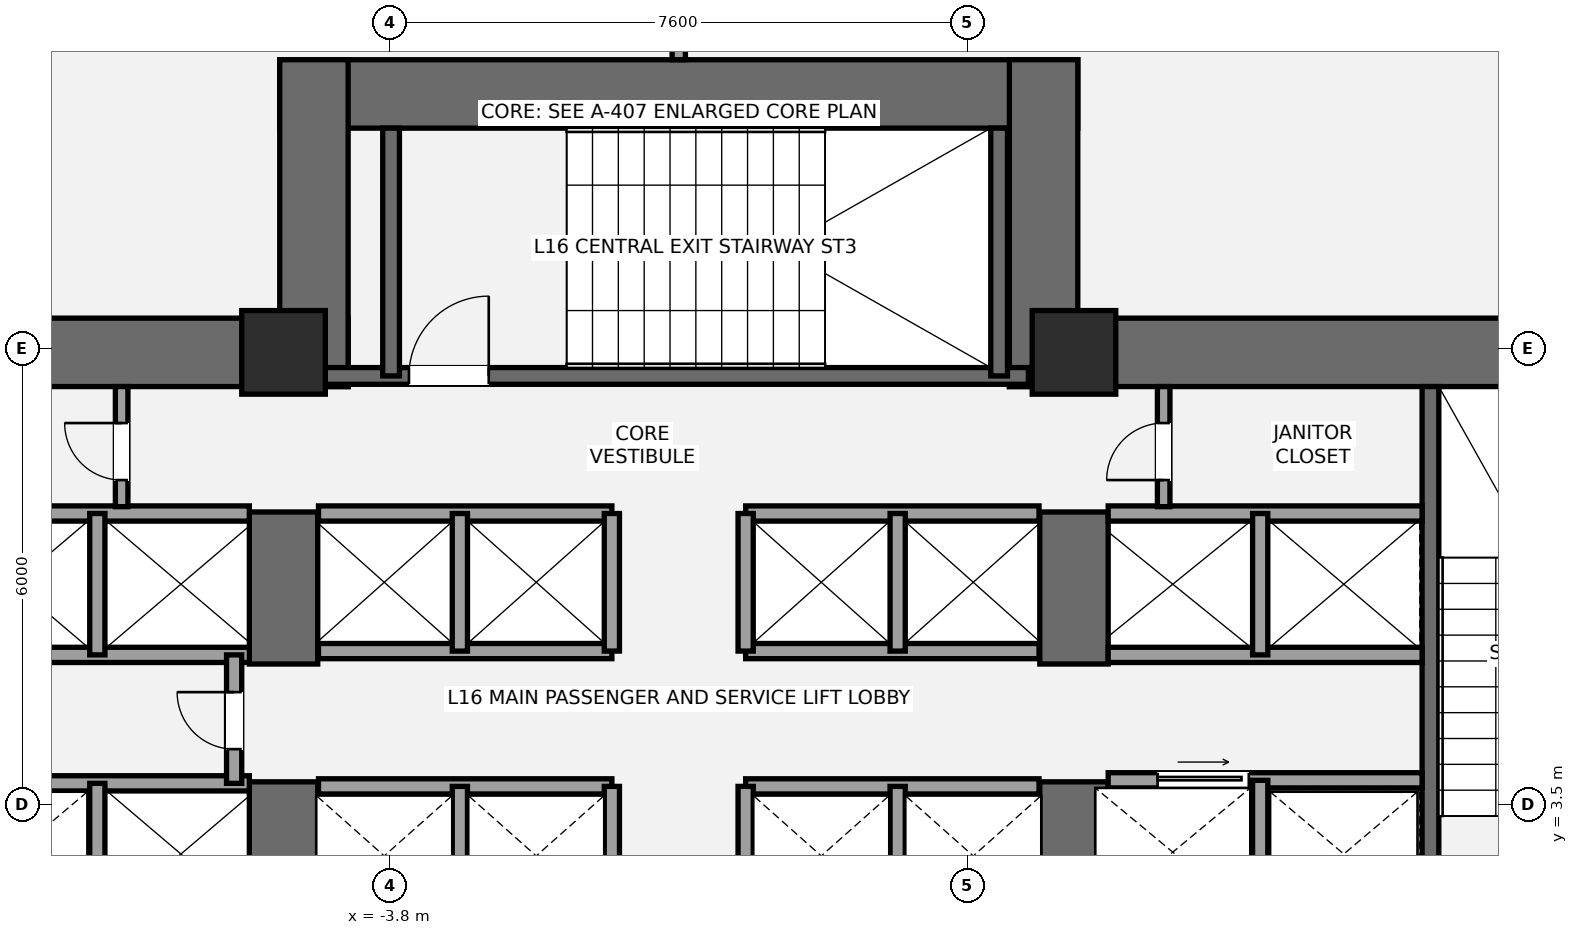
"""IFC4 building model, lengths in metres.
Left out: names, types, materials, properties, quantities, classifications, styles, units other than length and angle.
Written with IfcOpenShell. Run it as: python <this file> out.ifc"""

import sys

from ifc_helpers import new_model, si_unit, direction, frame, frame_2d, origin, origin_2d, place, context, subcontext, project, spatial, rectangle, extrude, element, fill, save


model = new_model("IFC4")
c1 = context("Model", 3, precision=1e-05, world=origin(), true_north=direction((0.0, 1.0)))
c2 = subcontext(c1, "Body", "Model", "MODEL_VIEW")
j1 = project(units=[si_unit("LENGTHUNIT", "METRE"), si_unit("PLANEANGLEUNIT", "RADIAN")], contexts=[c1])
p1 = place(None, origin())
s1 = spatial("IfcSite", under=j1, at=p1, CompositionType="ELEMENT")
p2 = place(p1, origin())
s2 = spatial("IfcBuilding", under=s1, at=p2, CompositionType="ELEMENT")
p3 = place(p2, frame((0.0, 0.0, 63.0)))
s3 = spatial("IfcBuildingStorey", under=s2, at=p3, CompositionType="ELEMENT", Elevation=63.0)
p4 = place(p3, frame((-14.05, 9.45, 0.0), z_axis=(0.0, 0.0, 1.0), x_axis=(1.0, 0.0, 0.0)))
e1 = element("IfcWall", 1, at=p4, inside=s3, PredefinedType="SHEAR", context=c2, shape_type="SweptSolid", body=[
    extrude(rectangle(XDim=9.7, YDim=0.9, at=frame_2d((4.85, 0.0))), origin(), (0.0, 0.0, 1.0), 3.6),
])
p5 = place(p3, frame((-5.2, 0.95, 0.0), z_axis=(0.0, 0.0, 1.0), x_axis=(0.0, 1.0, 0.0)))
e2 = element("IfcWall", 2, at=p5, inside=s3, PredefinedType="SHEAR", context=c2, shape_type="SweptSolid", body=[
    extrude(rectangle(XDim=2.85, YDim=0.9, at=frame_2d((1.425, 0.0))), origin(), (0.0, 0.0, 1.0), 3.6),
])
p6 = place(p3, frame((-5.2, 5.35, 0.0), z_axis=(0.0, 0.0, 1.0), x_axis=(0.0, 1.0, 0.0)))
e3 = element("IfcWall", 3, at=p6, inside=s3, PredefinedType="SHEAR", context=c2, shape_type="SweptSolid", body=[
    extrude(rectangle(XDim=2.0, YDim=0.9, at=frame_2d((1.0, 0.0))), origin(), (0.0, 0.0, 1.0), 3.6),
])
p7 = place(p3, frame((4.35, 9.45, 0.0), z_axis=(0.0, 0.0, 1.0), x_axis=(1.0, 0.0, 0.0)))
e4 = element("IfcWall", 4, at=p7, inside=s3, PredefinedType="SHEAR", context=c2, shape_type="SweptSolid", body=[
    extrude(rectangle(XDim=9.7, YDim=0.9, at=frame_2d((4.85, 0.0))), origin(), (0.0, 0.0, 1.0), 3.6),
])
p8 = place(p3, frame((5.2, 0.95, 0.0), z_axis=(0.0, 0.0, 1.0), x_axis=(0.0, 1.0, 0.0)))
e5 = element("IfcWall", 5, at=p8, inside=s3, PredefinedType="SHEAR", context=c2, shape_type="SweptSolid", body=[
    extrude(rectangle(XDim=2.85, YDim=0.9, at=frame_2d((1.425, 0.0))), origin(), (0.0, 0.0, 1.0), 3.6),
])
p9 = place(p3, frame((5.2, 5.35, 0.0), z_axis=(0.0, 0.0, 1.0), x_axis=(0.0, 1.0, 0.0)))
e6 = element("IfcWall", 6, at=p9, inside=s3, PredefinedType="SHEAR", context=c2, shape_type="SweptSolid", body=[
    extrude(rectangle(XDim=2.0, YDim=0.9, at=frame_2d((1.0, 0.0))), origin(), (0.0, 0.0, 1.0), 3.6),
])
p10 = place(p3, frame((9.89, 1.85, 0.0), z_axis=(0.0, 0.0, 1.0), x_axis=(0.0, 1.0, 0.0)))
e7 = element("IfcWall", 7, at=p10, inside=s3, PredefinedType="SHEAR", context=c2, shape_type="SweptSolid", body=[
    extrude(rectangle(XDim=7.15, YDim=0.22, at=frame_2d((3.575, 0.0))), origin(), (0.0, 0.0, 1.0), 3.6),
])
p11 = place(p3, frame((-5.25, 12.85, 0.0), z_axis=(0.0, 0.0, 1.0), x_axis=(1.0, 0.0, 0.0)))
e8 = element("IfcWall", 8, at=p11, inside=s3, PredefinedType="SHEAR", context=c2, shape_type="SweptSolid", body=[
    extrude(rectangle(XDim=10.5, YDim=0.9, at=frame_2d((5.25, 0.0))), origin(), (0.0, 0.0, 1.0), 3.6),
])
for number, where, z_axis, x_axis in (
    (9, (-4.8, 9.0, 0.0), (0.0, 0.0, 1.0), (0.0, 1.0, 0.0)),
    (10, (4.8, 9.0, 0.0), (0.0, 0.0, 1.0), (0.0, 1.0, 0.0)),
):
    element("IfcWall", number, at=place(p3, frame(where, z_axis=z_axis, x_axis=x_axis)), inside=s3, PredefinedType="SHEAR", context=c2, shape_type="SweptSolid", body=[
        extrude(rectangle(XDim=4.3, YDim=0.9, at=frame_2d((2.15, 0.0))), origin(), (0.0, 0.0, 1.0), 3.6),
    ])
p12 = place(p3, frame((-4.7, 9.14, 0.0), z_axis=(0.0, 0.0, 1.0), x_axis=(1.0, 0.0, 0.0)))
e11 = element("IfcWall", 11, at=p12, inside=s3, PredefinedType="SHEAR", context=c2, shape_type="SweptSolid", body=[
    extrude(rectangle(XDim=9.3, YDim=0.22, at=frame_2d((4.65, 0.0))), origin(), (0.0, 0.0, 1.0), 3.6),
])
p13 = place(p12, frame((1.15, 0.0, 0.0)))
e12 = element("IfcOpeningElement", 12, at=p13, cuts=e11, PredefinedType="OPENING", context=c2, shape_type="SweptSolid", body=[
    extrude(rectangle(XDim=1.05, YDim=2.15, at=frame_2d((0.525, 1.075))), frame((0.0, 0.12, 0.0), z_axis=(0.0, -1.0, 0.0), x_axis=(1.0, 0.0, 0.0)), (0.0, 0.0, 1.0), 0.24),
])
for number, where, z_axis, x_axis in (
    (13, (-3.785, 9.14, 0.0), (0.0, 0.0, 1.0), (0.0, 1.0, 0.0)),
    (14, (4.215, 9.14, 0.0), (0.0, 0.0, 1.0), (0.0, 1.0, 0.0)),
):
    element("IfcWall", number, at=place(p3, frame(where, z_axis=z_axis, x_axis=x_axis)), inside=s3, PredefinedType="SHEAR", context=c2, shape_type="SweptSolid", body=[
        extrude(rectangle(XDim=3.26, YDim=0.22, at=frame_2d((1.63, 0.0))), origin(), (0.0, 0.0, 1.0), 3.6),
    ])
for number, where, z_axis, x_axis in (
    (15, (-5.2, 9.45, 0.0), (0.0, 0.0, 1.0), (1.0, 0.0, 0.0)),
    (16, (5.2, 9.45, 0.0), (0.0, 0.0, 1.0), (1.0, 0.0, 0.0)),
):
    element("IfcColumn", number, at=place(p3, frame(where, z_axis=z_axis, x_axis=x_axis)), inside=s3, PredefinedType="COLUMN", context=c2, shape_type="SweptSolid", body=[
        extrude(rectangle(XDim=1.1, YDim=1.1, at=origin_2d()), origin(), (0.0, 0.0, 1.0), 3.6),
    ])
p14 = place(p3, frame((-9.78, 3.78, 0.0), z_axis=(0.0, 0.0, 1.0), x_axis=(1.0, 0.0, 0.0)))
e17 = element("IfcWall", 17, at=p14, inside=s3, PredefinedType="SOLIDWALL", context=c2, shape_type="SweptSolid", body=[
    extrude(rectangle(XDim=4.13, YDim=0.2, at=frame_2d((2.065, 0.0))), origin(), (0.0, 0.0, 1.0), 3.4),
])
p15 = place(p3, frame((-7.65, 1.85, 0.0), z_axis=(0.0, 0.0, 1.0), x_axis=(0.0, 1.0, 0.0)))
e18 = element("IfcWall", 18, at=p15, inside=s3, PredefinedType="SOLIDWALL", context=c2, shape_type="SweptSolid", body=[
    extrude(rectangle(XDim=1.93, YDim=0.2, at=frame_2d((0.965, 0.0))), origin(), (0.0, 0.0, 1.0), 3.4),
])
for number, where, z_axis, x_axis in (
    (19, (-9.78, 5.47, 0.0), (0.0, 0.0, 1.0), (1.0, 0.0, 0.0)),
    (20, (-9.78, 7.33, 0.0), (0.0, 0.0, 1.0), (1.0, 0.0, 0.0)),
):
    element("IfcWall", number, at=place(p3, frame(where, z_axis=z_axis, x_axis=x_axis)), inside=s3, PredefinedType="SOLIDWALL", context=c2, shape_type="SweptSolid", body=[
        extrude(rectangle(XDim=4.13, YDim=0.2, at=frame_2d((2.065, 0.0))), origin(), (0.0, 0.0, 1.0), 3.4),
    ])
p16 = place(p3, frame((-7.65, 5.47, 0.0), z_axis=(0.0, 0.0, 1.0), x_axis=(0.0, 1.0, 0.0)))
e21 = element("IfcWall", 21, at=p16, inside=s3, PredefinedType="SOLIDWALL", context=c2, shape_type="SweptSolid", body=[
    extrude(rectangle(XDim=1.86, YDim=0.2, at=frame_2d((0.93, 0.0))), origin(), (0.0, 0.0, 1.0), 3.4),
])
p17 = place(p3, frame((-5.85, 3.78, 0.0), z_axis=(0.0, 0.0, 1.0), x_axis=(0.0, 1.0, 0.0)))
e22 = element("IfcWall", 22, at=p17, inside=s3, PredefinedType="SOLIDWALL", context=c2, shape_type="SweptSolid", body=[
    extrude(rectangle(XDim=1.69, YDim=0.2, at=frame_2d((0.845, 0.0))), origin(), (0.0, 0.0, 1.0), 3.4),
])
p18 = place(p17, frame((0.45, 0.0, 0.0)))
e23 = element("IfcOpeningElement", 23, at=p18, cuts=e22, PredefinedType="OPENING", context=c2, shape_type="SweptSolid", body=[
    extrude(rectangle(XDim=0.75, YDim=2.1, at=frame_2d((0.375, 1.05))), frame((0.0, 0.11, 0.0), z_axis=(0.0, -1.0, 0.0), x_axis=(1.0, 0.0, 0.0)), (0.0, 0.0, 1.0), 0.22),
])
p19 = place(p3, frame((5.65, 3.82, 0.0), z_axis=(0.0, 0.0, 1.0), x_axis=(1.0, 0.0, 0.0)))
e24 = element("IfcWall", 24, at=p19, inside=s3, PredefinedType="SOLIDWALL", context=c2, shape_type="SweptSolid", body=[
    extrude(rectangle(XDim=4.13, YDim=0.2, at=frame_2d((2.065, 0.0))), origin(), (0.0, 0.0, 1.0), 3.4),
])
p20 = place(p19, frame((0.65, 0.0, 0.0)))
e25 = element("IfcOpeningElement", 25, at=p20, cuts=e24, PredefinedType="OPENING", context=c2, shape_type="SweptSolid", body=[
    extrude(rectangle(XDim=1.2, YDim=2.2, at=frame_2d((0.6, 1.1))), frame((0.0, 0.11, 0.0), z_axis=(0.0, -1.0, 0.0), x_axis=(1.0, 0.0, 0.0)), (0.0, 0.0, 1.0), 0.22),
])
p21 = place(p3, frame((7.65, 1.85, 0.0), z_axis=(0.0, 0.0, 1.0), x_axis=(0.0, 1.0, 0.0)))
e26 = element("IfcWall", 26, at=p21, inside=s3, PredefinedType="SOLIDWALL", context=c2, shape_type="SweptSolid", body=[
    extrude(rectangle(XDim=1.97, YDim=0.2, at=frame_2d((0.985, 0.0))), origin(), (0.0, 0.0, 1.0), 3.4),
])
for number, where, z_axis, x_axis in (
    (27, (5.65, 5.47, 0.0), (0.0, 0.0, 1.0), (1.0, 0.0, 0.0)),
    (28, (5.65, 7.33, 0.0), (0.0, 0.0, 1.0), (1.0, 0.0, 0.0)),
):
    element("IfcWall", number, at=place(p3, frame(where, z_axis=z_axis, x_axis=x_axis)), inside=s3, PredefinedType="SOLIDWALL", context=c2, shape_type="SweptSolid", body=[
        extrude(rectangle(XDim=4.13, YDim=0.2, at=frame_2d((2.065, 0.0))), origin(), (0.0, 0.0, 1.0), 3.4),
    ])
p22 = place(p3, frame((7.65, 5.47, 0.0), z_axis=(0.0, 0.0, 1.0), x_axis=(0.0, 1.0, 0.0)))
e29 = element("IfcWall", 29, at=p22, inside=s3, PredefinedType="SOLIDWALL", context=c2, shape_type="SweptSolid", body=[
    extrude(rectangle(XDim=1.86, YDim=0.2, at=frame_2d((0.93, 0.0))), origin(), (0.0, 0.0, 1.0), 3.4),
])
for number, where, z_axis, x_axis in (
    (30, (-4.74, 3.74, 0.0), (0.0, 0.0, 1.0), (1.0, 0.0, 0.0)),
    (31, (0.88, 3.74, 0.0), (0.0, 0.0, 1.0), (1.0, 0.0, 0.0)),
):
    element("IfcWall", number, at=place(p3, frame(where, z_axis=z_axis, x_axis=x_axis)), inside=s3, PredefinedType="SOLIDWALL", context=c2, shape_type="SweptSolid", body=[
        extrude(rectangle(XDim=3.86, YDim=0.2, at=frame_2d((1.93, 0.0))), origin(), (0.0, 0.0, 1.0), 3.4),
    ])
for number, where, z_axis, x_axis in (
    (32, (-2.88, 1.92, 0.0), (0.0, 0.0, 1.0), (0.0, 1.0, 0.0)),
    (33, (2.88, 1.92, 0.0), (0.0, 0.0, 1.0), (0.0, 1.0, 0.0)),
    (34, (-0.88, 1.92, 0.0), (0.0, 0.0, 1.0), (0.0, 1.0, 0.0)),
    (35, (0.88, 1.92, 0.0), (0.0, 0.0, 1.0), (0.0, 1.0, 0.0)),
):
    element("IfcWall", number, at=place(p3, frame(where, z_axis=z_axis, x_axis=x_axis)), inside=s3, PredefinedType="SOLIDWALL", context=c2, shape_type="SweptSolid", body=[
        extrude(rectangle(XDim=1.82, YDim=0.2, at=frame_2d((0.91, 0.0))), origin(), (0.0, 0.0, 1.0), 3.4),
    ])
for number, where, z_axis, x_axis in (
    (36, (-4.74, 5.52, 0.0), (0.0, 0.0, 1.0), (1.0, 0.0, 0.0)),
    (37, (0.88, 5.52, 0.0), (0.0, 0.0, 1.0), (1.0, 0.0, 0.0)),
    (38, (-4.74, 7.33, 0.0), (0.0, 0.0, 1.0), (1.0, 0.0, 0.0)),
    (39, (0.88, 7.33, 0.0), (0.0, 0.0, 1.0), (1.0, 0.0, 0.0)),
):
    element("IfcWall", number, at=place(p3, frame(where, z_axis=z_axis, x_axis=x_axis)), inside=s3, PredefinedType="SOLIDWALL", context=c2, shape_type="SweptSolid", body=[
        extrude(rectangle(XDim=3.86, YDim=0.2, at=frame_2d((1.93, 0.0))), origin(), (0.0, 0.0, 1.0), 3.4),
    ])
for number, where, z_axis, x_axis in (
    (40, (-2.88, 5.52, 0.0), (0.0, 0.0, 1.0), (0.0, 1.0, 0.0)),
    (41, (2.88, 5.52, 0.0), (0.0, 0.0, 1.0), (0.0, 1.0, 0.0)),
    (42, (-0.88, 5.52, 0.0), (0.0, 0.0, 1.0), (0.0, 1.0, 0.0)),
    (43, (0.88, 5.52, 0.0), (0.0, 0.0, 1.0), (0.0, 1.0, 0.0)),
):
    element("IfcWall", number, at=place(p3, frame(where, z_axis=z_axis, x_axis=x_axis)), inside=s3, PredefinedType="SOLIDWALL", context=c2, shape_type="SweptSolid", body=[
        extrude(rectangle(XDim=1.81, YDim=0.2, at=frame_2d((0.905, 0.0))), origin(), (0.0, 0.0, 1.0), 3.4),
    ])
p23 = place(p3, frame((-7.33, 7.42, 0.0), z_axis=(0.0, 0.0, 1.0), x_axis=(0.0, 1.0, 0.0)))
e44 = element("IfcWall", 44, at=p23, inside=s3, PredefinedType="PARTITIONING", context=c2, shape_type="SweptSolid", body=[
    extrude(rectangle(XDim=1.58, YDim=0.165, at=frame_2d((0.79, 0.0))), origin(), (0.0, 0.0, 1.0), 3.4),
])
p24 = place(p23, frame((0.35, 0.0, 0.0)))
e45 = element("IfcOpeningElement", 45, at=p24, cuts=e44, PredefinedType="OPENING", context=c2, shape_type="SweptSolid", body=[
    extrude(rectangle(XDim=0.75, YDim=2.1, at=frame_2d((0.375, 1.05))), frame((0.0, 0.093, 0.0), z_axis=(0.0, -1.0, 0.0), x_axis=(1.0, 0.0, 0.0)), (0.0, 0.0, 1.0), 0.185),
])
p25 = place(p3, frame((6.38, 7.42, 0.0), z_axis=(0.0, 0.0, 1.0), x_axis=(0.0, 1.0, 0.0)))
e46 = element("IfcWall", 46, at=p25, inside=s3, PredefinedType="PARTITIONING", context=c2, shape_type="SweptSolid", body=[
    extrude(rectangle(XDim=1.58, YDim=0.165, at=frame_2d((0.79, 0.0))), origin(), (0.0, 0.0, 1.0), 3.4),
])
p26 = place(p25, frame((0.35, 0.0, 0.0)))
e47 = element("IfcOpeningElement", 47, at=p26, cuts=e46, PredefinedType="OPENING", context=c2, shape_type="SweptSolid", body=[
    extrude(rectangle(XDim=0.75, YDim=2.1, at=frame_2d((0.375, 1.05))), frame((0.0, 0.093, 0.0), z_axis=(0.0, -1.0, 0.0), x_axis=(1.0, 0.0, 0.0)), (0.0, 0.0, 1.0), 0.185),
])
p27 = place(p3, frame((0.0, 13.3, 0.0), z_axis=(0.0, 0.0, 1.0), x_axis=(0.0, 1.0, 0.0)))
e48 = element("IfcWall", 48, at=p27, inside=s3, PredefinedType="PARTITIONING", context=c2, shape_type="SweptSolid", body=[
    extrude(rectangle(XDim=6.159, YDim=0.175, at=frame_2d((3.08, 0.0))), origin(), (0.0, 0.0, 1.0), 3.4),
])
p28 = place(p13, origin())
e49 = element("IfcDoor", 49, at=p28, inside=s3, OperationType="SINGLE_SWING_RIGHT", PredefinedType="DOOR", context=c2, shape_type="SweptSolid", body=[
    extrude(rectangle(XDim=1.05, YDim=2.15, at=frame_2d((0.525, 1.075))), frame((0.0, 0.025, 0.0), z_axis=(0.0, -1.0, 0.0), x_axis=(1.0, 0.0, 0.0)), (0.0, 0.0, 1.0), 0.05),
])
fill(e12, e49)
p29 = place(p18, origin())
e50 = element("IfcDoor", 50, at=p29, inside=s3, OperationType="SINGLE_SWING_RIGHT", PredefinedType="DOOR", context=c2, shape_type="SweptSolid", body=[
    extrude(rectangle(XDim=0.75, YDim=2.1, at=frame_2d((0.375, 1.05))), frame((0.0, 0.025, 0.0), z_axis=(0.0, -1.0, 0.0), x_axis=(1.0, 0.0, 0.0)), (0.0, 0.0, 1.0), 0.05),
])
fill(e23, e50)
p30 = place(p20, origin())
e51 = element("IfcDoor", 51, at=p30, inside=s3, OperationType="SLIDING_TO_RIGHT", PredefinedType="DOOR", context=c2, shape_type="SweptSolid", body=[
    extrude(rectangle(XDim=1.2, YDim=2.2, at=frame_2d((0.6, 1.1))), frame((0.0, 0.025, 0.0), z_axis=(0.0, -1.0, 0.0), x_axis=(1.0, 0.0, 0.0)), (0.0, 0.0, 1.0), 0.05),
])
fill(e25, e51)
p31 = place(p24, origin())
e52 = element("IfcDoor", 52, at=p31, inside=s3, OperationType="SINGLE_SWING_RIGHT", PredefinedType="DOOR", context=c2, shape_type="SweptSolid", body=[
    extrude(rectangle(XDim=0.75, YDim=2.1, at=frame_2d((0.375, 1.05))), frame((0.0, 0.025, 0.0), z_axis=(0.0, -1.0, 0.0), x_axis=(1.0, 0.0, 0.0)), (0.0, 0.0, 1.0), 0.05),
])
fill(e45, e52)
p32 = place(p26, origin())
e53 = element("IfcDoor", 53, at=p32, inside=s3, OperationType="SINGLE_SWING_LEFT", PredefinedType="DOOR", context=c2, shape_type="SweptSolid", body=[
    extrude(rectangle(XDim=0.75, YDim=2.1, at=frame_2d((0.375, 1.05))), frame((0.0, 0.025, 0.0), z_axis=(0.0, -1.0, 0.0), x_axis=(1.0, 0.0, 0.0)), (0.0, 0.0, 1.0), 0.05),
])
fill(e47, e53)
save(model, sys.argv[1])
